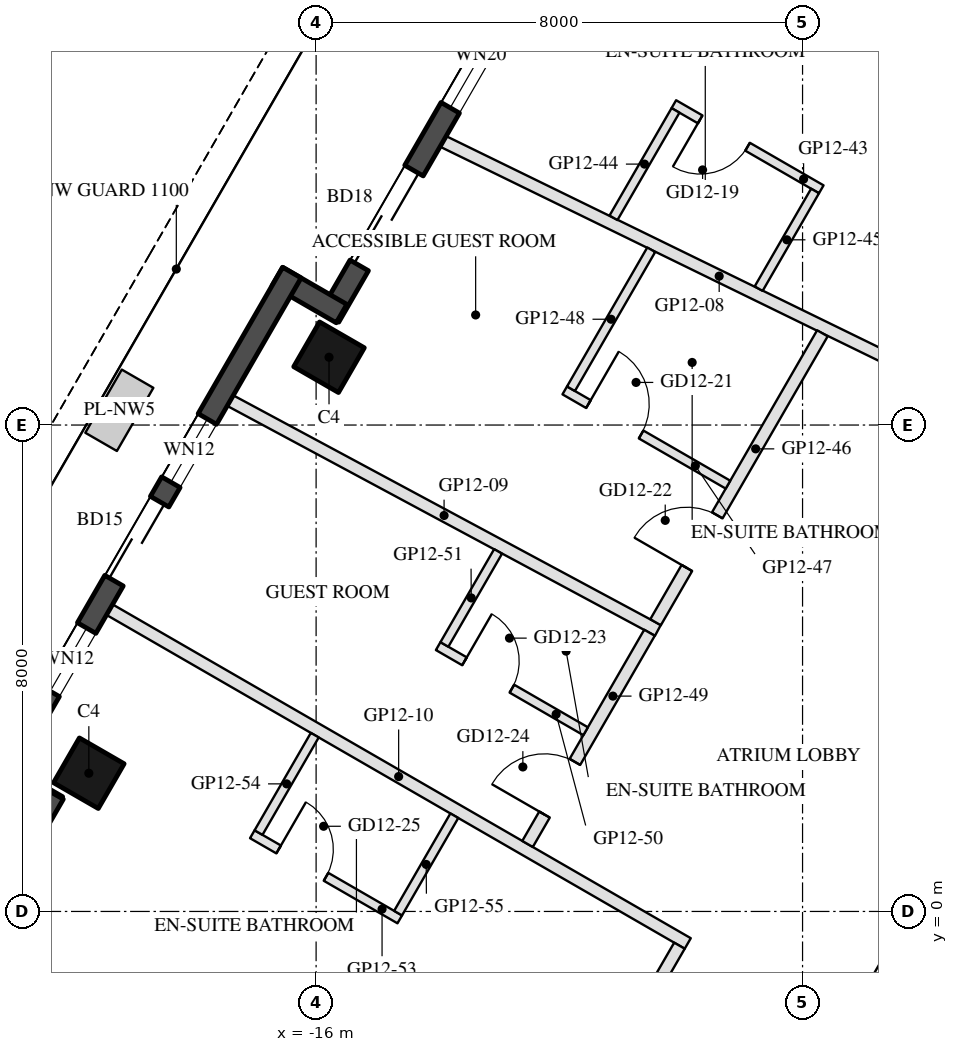
"""IFC4 building model, lengths in metres.
Left out: names, types, materials, properties, quantities, classifications, styles, units other than length and angle.
Written with IfcOpenShell. Run it as: python <this file> out.ifc"""

import sys

from ifc_helpers import new_model, si_unit, direction, frame, frame_2d, origin, origin_2d, place, context, subcontext, project, spatial, rectangle, hollow_rectangle, extrude, element, fill, save


model = new_model("IFC4")
c1 = context("Model", 3, precision=1e-05, world=origin(), true_north=direction((0.0, 1.0)))
c2 = subcontext(c1, "Body", "Model", "MODEL_VIEW")
j1 = project(units=[si_unit("LENGTHUNIT", "METRE"), si_unit("PLANEANGLEUNIT", "RADIAN")], contexts=[c1])
p1 = place(None, origin())
s1 = spatial("IfcSite", under=j1, at=p1, CompositionType="ELEMENT")
p2 = place(p1, origin())
s2 = spatial("IfcBuilding", under=s1, at=p2, CompositionType="ELEMENT")
p3 = place(p2, frame((0.0, 0.0, 150.3)))
s3 = spatial("IfcBuildingStorey", under=s2, at=p3, CompositionType="ELEMENT", Elevation=150.3)
for number, where, z_axis, x_axis in (
    (1, (-15.788, 9.115, 0.0), (0.0, 0.0, 1.0), (0.5, 0.866, 0.0)),
    (2, (-19.738, 2.273, 0.0), (0.0, 0.0, 1.0), (0.5, 0.866, 0.0)),
):
    element("IfcColumn", number, at=place(p3, frame(where, z_axis=z_axis, x_axis=x_axis)), inside=s3, PredefinedType="COLUMN", context=c2, shape_type="SweptSolid", body=[
        extrude(hollow_rectangle(XDim=0.85, YDim=0.85, WallThickness=0.04, at=origin_2d()), origin(), (0.0, 0.0, 1.0), 3.7),
    ])
p4 = place(p3, frame((-12.409, 15.617, 0.0), z_axis=(0.0, 0.0, 1.0), x_axis=(-0.500003597184, -0.866023326939, 0.0)))
e3 = element("IfcWall", 3, at=p4, inside=s3, PredefinedType="SOLIDWALL", context=c2, shape_type="SweptSolid", body=[
    extrude(rectangle(XDim=6.74, YDim=0.35, at=frame_2d((3.37, 0.0))), origin(), (0.0, 0.0, 1.0), 3.55),
])
p5 = place(p4, frame((0.77, 0.0, 0.3)))
e4 = element("IfcOpeningElement", 4, at=p5, cuts=e3, PredefinedType="OPENING", context=c2, shape_type="SweptSolid", body=[
    extrude(rectangle(XDim=2.0, YDim=2.65, at=frame_2d((1.0, 1.325))), frame((0.0, 0.185, 0.0), z_axis=(0.0, -1.0, 0.0), x_axis=(1.0, 0.0, 0.0)), (0.0, 0.0, 1.0), 0.37),
])
p6 = place(p4, frame((3.964, 0.0, 0.0)))
e5 = element("IfcOpeningElement", 5, at=p6, cuts=e3, PredefinedType="OPENING", context=c2, shape_type="SweptSolid", body=[
    extrude(rectangle(XDim=1.8, YDim=2.4, at=frame_2d((0.9, 1.2))), frame((0.0, 0.185, 0.0), z_axis=(0.0, -1.0, 0.0), x_axis=(1.0, 0.0, 0.0)), (0.0, 0.0, 1.0), 0.37),
])
p7 = place(p3, frame((-15.581, 9.833, 0.0), z_axis=(0.0, 0.0, 1.0), x_axis=(-0.866055662726, 0.499947586314, 0.0)))
e6 = element("IfcWall", 6, at=p7, inside=s3, PredefinedType="SOLIDWALL", context=c2, shape_type="SweptSolid", body=[
    extrude(rectangle(XDim=1.22, YDim=0.35, at=frame_2d((0.61, 0.0))), origin(), (0.0, 0.0, 1.0), 3.55),
])
p8 = place(p3, frame((-16.398, 10.507, 0.0), z_axis=(0.0, 0.0, 1.0), x_axis=(-0.499999142773, -0.866025898704, 0.0)))
e7 = element("IfcWall", 7, at=p8, inside=s3, PredefinedType="SOLIDWALL", context=c2, shape_type="SweptSolid", body=[
    extrude(rectangle(XDim=9.7, YDim=0.35, at=frame_2d((4.85, 0.0))), origin(), (0.0, 0.0, 1.0), 3.55),
])
p9 = place(p8, frame((4.35, 0.0, 0.0)))
e8 = element("IfcOpeningElement", 8, at=p9, cuts=e7, PredefinedType="OPENING", context=c2, shape_type="SweptSolid", body=[
    extrude(rectangle(XDim=1.5, YDim=2.4, at=frame_2d((0.75, 1.2))), frame((0.0, 0.185, 0.0), z_axis=(0.0, -1.0, 0.0), x_axis=(1.0, 0.0, 0.0)), (0.0, 0.0, 1.0), 0.37),
])
p10 = place(p8, frame((2.78, 0.0, 0.3)))
e9 = element("IfcOpeningElement", 9, at=p10, cuts=e7, PredefinedType="OPENING", context=c2, shape_type="SweptSolid", body=[
    extrude(rectangle(XDim=1.2, YDim=2.65, at=frame_2d((0.6, 1.325))), frame((0.0, 0.185, 0.0), z_axis=(0.0, -1.0, 0.0), x_axis=(1.0, 0.0, 0.0)), (0.0, 0.0, 1.0), 0.37),
])
p11 = place(p8, frame((6.75, 0.0, 0.3)))
e10 = element("IfcOpeningElement", 10, at=p11, cuts=e7, PredefinedType="OPENING", context=c2, shape_type="SweptSolid", body=[
    extrude(rectangle(XDim=1.2, YDim=2.65, at=frame_2d((0.6, 1.325))), frame((0.0, 0.185, 0.0), z_axis=(0.0, -1.0, 0.0), x_axis=(1.0, 0.0, 0.0)), (0.0, 0.0, 1.0), 0.37),
])
p12 = place(p3, frame((-21.312, 2.346, 0.0), z_axis=(0.0, 0.0, 1.0), x_axis=(0.866005645448, -0.500034220881, 0.0)))
e11 = element("IfcWall", 11, at=p12, inside=s3, PredefinedType="SOLIDWALL", context=c2, shape_type="SweptSolid", body=[
    extrude(rectangle(XDim=1.22, YDim=0.35, at=frame_2d((0.61, 0.0))), origin(), (0.0, 0.0, 1.0), 3.55),
])
p13 = place(p3, frame((-20.309, 1.934, 0.0), z_axis=(0.0, 0.0, 1.0), x_axis=(-0.499992114976, -0.866029956157, 0.0)))
e12 = element("IfcWall", 12, at=p13, inside=s3, PredefinedType="SOLIDWALL", context=c2, shape_type="SweptSolid", body=[
    extrude(rectangle(XDim=6.74, YDim=0.35, at=frame_2d((3.37, 0.0))), origin(), (0.0, 0.0, 1.0), 3.55),
])
p14 = place(p13, frame((0.77, 0.0, 0.0)))
e13 = element("IfcOpeningElement", 13, at=p14, cuts=e12, PredefinedType="OPENING", context=c2, shape_type="SweptSolid", body=[
    extrude(rectangle(XDim=2.4, YDim=2.4, at=frame_2d((1.2, 1.2))), frame((0.0, 0.185, 0.0), z_axis=(0.0, -1.0, 0.0), x_axis=(1.0, 0.0, 0.0)), (0.0, 0.0, 1.0), 0.37),
])
p15 = place(p13, frame((3.47, 0.0, 0.3)))
e14 = element("IfcOpeningElement", 14, at=p15, cuts=e12, PredefinedType="OPENING", context=c2, shape_type="SweptSolid", body=[
    extrude(rectangle(XDim=2.9, YDim=2.65, at=frame_2d((1.45, 1.325))), frame((0.0, 0.185, 0.0), z_axis=(0.0, -1.0, 0.0), x_axis=(1.0, 0.0, 0.0)), (0.0, 0.0, 1.0), 0.37),
])
p16 = place(p3, frame((-13.911, 12.665, 0.0), z_axis=(0.0, 0.0, 1.0), x_axis=(0.898639294085, -0.438688293811, 0.0)))
e15 = element("IfcWall", 15, at=p16, inside=s3, PredefinedType="PARTITIONING", context=c2, shape_type="SweptSolid", body=[
    extrude(rectangle(XDim=10.104, YDim=0.2, at=frame_2d((5.052, 0.0))), origin(), (0.0, 0.0, 1.0), 2.95),
])
p17 = place(p3, frame((-17.412, 8.402, 0.0), z_axis=(0.0, 0.0, 1.0), x_axis=(0.880917469793, -0.473269913912, 0.0)))
e16 = element("IfcWall", 16, at=p17, inside=s3, PredefinedType="PARTITIONING", context=c2, shape_type="SweptSolid", body=[
    extrude(rectangle(XDim=7.984, YDim=0.2, at=frame_2d((3.992, 0.0))), origin(), (0.0, 0.0, 1.0), 3.06),
])
p18 = place(p3, frame((-19.397, 4.963, 0.0), z_axis=(0.0, 0.0, 1.0), x_axis=(0.866027479907, -0.499996404033, 0.0)))
e17 = element("IfcWall", 17, at=p18, inside=s3, PredefinedType="PARTITIONING", context=c2, shape_type="SweptSolid", body=[
    extrude(rectangle(XDim=10.98, YDim=0.2, at=frame_2d((5.49, 0.0))), origin(), (0.0, 0.0, 1.0), 3.06),
])
p19 = place(p3, frame((-7.692, 11.877, 0.0), z_axis=(0.0, 0.0, 1.0), x_axis=(-0.866034573852, 0.49998411664, 0.0)))
e18 = element("IfcWall", 18, at=p19, inside=s3, PredefinedType="PARTITIONING", context=c2, shape_type="SweptSolid", body=[
    extrude(rectangle(XDim=2.8, YDim=0.15, at=frame_2d((1.4, 0.0))), origin(), (0.0, 0.0, 1.0), 3.55),
])
p20 = place(p19, frame((1.4, 0.0, 0.0)))
e19 = element("IfcOpeningElement", 19, at=p20, cuts=e18, PredefinedType="OPENING", context=c2, shape_type="SweptSolid", body=[
    extrude(rectangle(XDim=0.9, YDim=2.1, at=frame_2d((0.45, 1.05))), frame((0.0, 0.085, 0.0), z_axis=(0.0, -1.0, 0.0), x_axis=(1.0, 0.0, 0.0)), (0.0, 0.0, 1.0), 0.17),
])
p21 = place(p3, frame((-10.089, 13.175, 0.0), z_axis=(0.0, 0.0, 1.0), x_axis=(-0.499988401207, -0.866032100247, 0.0)))
e20 = element("IfcWall", 20, at=p21, inside=s3, PredefinedType="PARTITIONING", context=c2, shape_type="SweptSolid", body=[
    extrude(rectangle(XDim=2.04, YDim=0.15, at=frame_2d((1.02, 0.0))), origin(), (0.0, 0.0, 1.0), 3.55),
])
p22 = place(p3, frame((-7.794, 11.85, 0.0), z_axis=(0.0, 0.0, 1.0), x_axis=(-0.500003477455, -0.866023396066, 0.0)))
e21 = element("IfcWall", 21, at=p22, inside=s3, PredefinedType="PARTITIONING", context=c2, shape_type="SweptSolid", body=[
    extrude(rectangle(XDim=1.855, YDim=0.15, at=frame_2d((0.927, 0.0))), origin(), (0.0, 0.0, 1.0), 3.55),
])
p23 = place(p3, frame((-10.417, 4.757, 0.0), z_axis=(0.0, 0.0, 1.0), x_axis=(0.50000105825, 0.866024792803, 0.0)))
e22 = element("IfcWall", 22, at=p23, inside=s3, PredefinedType="PARTITIONING", context=c2, shape_type="SweptSolid", body=[
    extrude(rectangle(XDim=5.487, YDim=0.2, at=frame_2d((2.743, 0.0))), origin(), (0.0, 0.0, 1.0), 2.95),
])
p24 = place(p23, frame((1.03, 0.0, 0.0)))
e23 = element("IfcOpeningElement", 23, at=p24, cuts=e22, PredefinedType="OPENING", context=c2, shape_type="SweptSolid", body=[
    extrude(rectangle(XDim=1.0, YDim=2.1, at=frame_2d((0.5, 1.05))), frame((0.0, 0.11, 0.0), z_axis=(0.0, -1.0, 0.0), x_axis=(1.0, 0.0, 0.0)), (0.0, 0.0, 1.0), 0.22),
])
p25 = place(p3, frame((-11.911, 8.57, 0.0), z_axis=(0.0, 0.0, 1.0), x_axis=(0.86600983753, -0.500026960575, 0.0)))
e24 = element("IfcWall", 24, at=p25, inside=s3, PredefinedType="PARTITIONING", context=c2, shape_type="SweptSolid", body=[
    extrude(rectangle(XDim=3.1, YDim=0.15, at=frame_2d((1.55, 0.0))), origin(), (0.0, 0.0, 1.0), 3.55),
])
p26 = place(p25, frame((0.45, 0.0, 0.0)))
e25 = element("IfcOpeningElement", 25, at=p26, cuts=e24, PredefinedType="OPENING", context=c2, shape_type="SweptSolid", body=[
    extrude(rectangle(XDim=1.0, YDim=2.1, at=frame_2d((0.5, 1.05))), frame((0.0, 0.085, 0.0), z_axis=(0.0, -1.0, 0.0), x_axis=(1.0, 0.0, 0.0)), (0.0, 0.0, 1.0), 0.17),
])
p27 = place(p3, frame((-10.489, 10.883, 0.0), z_axis=(0.0, 0.0, 1.0), x_axis=(-0.500018690203, -0.866014612722, 0.0)))
e26 = element("IfcWall", 26, at=p27, inside=s3, PredefinedType="PARTITIONING", context=c2, shape_type="SweptSolid", body=[
    extrude(rectangle(XDim=2.64, YDim=0.15, at=frame_2d((1.32, 0.0))), origin(), (0.0, 0.0, 1.0), 2.95),
])
p28 = place(p3, frame((-12.523, 1.11, 0.0), z_axis=(0.0, 0.0, 1.0), x_axis=(0.500021015799, 0.866013269967, 0.0)))
e27 = element("IfcWall", 27, at=p28, inside=s3, PredefinedType="PARTITIONING", context=c2, shape_type="SweptSolid", body=[
    extrude(rectangle(XDim=4.011, YDim=0.2, at=frame_2d((2.005, 0.0))), origin(), (0.0, 0.0, 1.0), 2.95),
])
p29 = place(p28, frame((0.558, 0.0, 0.0)))
e28 = element("IfcOpeningElement", 28, at=p29, cuts=e27, PredefinedType="OPENING", context=c2, shape_type="SweptSolid", body=[
    extrude(rectangle(XDim=1.0, YDim=2.1, at=frame_2d((0.5, 1.05))), frame((0.0, 0.11, 0.0), z_axis=(0.0, -1.0, 0.0), x_axis=(1.0, 0.0, 0.0)), (0.0, 0.0, 1.0), 0.22),
])
p30 = place(p3, frame((-13.993, 4.364, 0.0), z_axis=(0.0, 0.0, 1.0), x_axis=(0.866056369097, -0.49994636267, 0.0)))
e29 = element("IfcWall", 29, at=p30, inside=s3, PredefinedType="PARTITIONING", context=c2, shape_type="SweptSolid", body=[
    extrude(rectangle(XDim=2.8, YDim=0.15, at=frame_2d((1.4, 0.0))), origin(), (0.0, 0.0, 1.0), 3.55),
])
p31 = place(p30, frame((0.5, 0.0, 0.0)))
e30 = element("IfcOpeningElement", 30, at=p31, cuts=e29, PredefinedType="OPENING", context=c2, shape_type="SweptSolid", body=[
    extrude(rectangle(XDim=0.9, YDim=2.1, at=frame_2d((0.45, 1.05))), frame((0.0, 0.085, 0.0), z_axis=(0.0, -1.0, 0.0), x_axis=(1.0, 0.0, 0.0)), (0.0, 0.0, 1.0), 0.17),
])
p32 = place(p3, frame((-13.007, 5.921, 0.0), z_axis=(0.0, 0.0, 1.0), x_axis=(-0.500033502416, -0.866006060292, 0.0)))
e31 = element("IfcWall", 31, at=p32, inside=s3, PredefinedType="PARTITIONING", context=c2, shape_type="SweptSolid", body=[
    extrude(rectangle(XDim=1.767, YDim=0.15, at=frame_2d((0.883, 0.0))), origin(), (0.0, 0.0, 1.0), 3.55),
])
p33 = place(p3, frame((-12.269, -4.45, 0.0), z_axis=(0.0, 0.0, 1.0), x_axis=(0.500000259638, 0.866025253883, 0.0)))
e32 = element("IfcWall", 32, at=p33, inside=s3, PredefinedType="PARTITIONING", context=c2, shape_type="SweptSolid", body=[
    extrude(rectangle(XDim=4.488, YDim=0.2, at=frame_2d((2.244, 0.0))), origin(), (0.0, 0.0, 1.0), 2.95),
])
p34 = place(p33, frame((1.744, 0.0, 0.0)))
e33 = element("IfcOpeningElement", 33, at=p34, cuts=e32, PredefinedType="OPENING", context=c2, shape_type="SweptSolid", body=[
    extrude(rectangle(XDim=1.0, YDim=2.1, at=frame_2d((0.5, 1.05))), frame((0.0, 0.11, 0.0), z_axis=(0.0, -1.0, 0.0), x_axis=(1.0, 0.0, 0.0)), (0.0, 0.0, 1.0), 0.22),
])
p35 = place(p3, frame((-17.049, 1.27, 0.0), z_axis=(0.0, 0.0, 1.0), x_axis=(0.866034573852, -0.49998411664, 0.0)))
e34 = element("IfcWall", 34, at=p35, inside=s3, PredefinedType="PARTITIONING", context=c2, shape_type="SweptSolid", body=[
    extrude(rectangle(XDim=2.8, YDim=0.15, at=frame_2d((1.4, 0.0))), origin(), (0.0, 0.0, 1.0), 3.55),
])
p36 = place(p35, frame((0.5, 0.0, 0.0)))
e35 = element("IfcOpeningElement", 35, at=p36, cuts=e34, PredefinedType="OPENING", context=c2, shape_type="SweptSolid", body=[
    extrude(rectangle(XDim=0.9, YDim=2.1, at=frame_2d((0.45, 1.05))), frame((0.0, 0.085, 0.0), z_axis=(0.0, -1.0, 0.0), x_axis=(1.0, 0.0, 0.0)), (0.0, 0.0, 1.0), 0.17),
])
for number, where, z_axis, x_axis in (
    (36, (-16.022, 2.899, 0.0), (0.0, 0.0, 1.0), (-0.5, -0.866, 0.0)),
    (37, (-13.727, 1.574, 0.0), (0.0, 0.0, 1.0), (-0.5, -0.866, 0.0)),
):
    element("IfcWall", number, at=place(p3, frame(where, z_axis=z_axis, x_axis=x_axis)), inside=s3, PredefinedType="PARTITIONING", context=c2, shape_type="SweptSolid", body=[
        extrude(rectangle(XDim=1.85, YDim=0.15, at=frame_2d((0.925, 0.0))), origin(), (0.0, 0.0, 1.0), 3.55),
    ])
p37 = place(p5, origin())
e38 = element("IfcWindow", 38, at=p37, inside=s3, PartitioningType="SINGLE_PANEL", PredefinedType="WINDOW", context=c2, shape_type="SweptSolid", body=[
    extrude(rectangle(XDim=2.0, YDim=2.65, at=frame_2d((1.0, 1.325))), frame((0.0, 0.03, 0.0), z_axis=(0.0, -1.0, 0.0), x_axis=(1.0, 0.0, 0.0)), (0.0, 0.0, 1.0), 0.06),
])
fill(e4, e38)
p38 = place(p6, frame((1.8, 0.0, 0.0), z_axis=(0.0, 0.0, 1.0), x_axis=(-1.0, 0.0, 0.0)))
e39 = element("IfcDoor", 39, at=p38, inside=s3, OperationType="SLIDING_TO_LEFT", PredefinedType="DOOR", context=c2, shape_type="SweptSolid", body=[
    extrude(rectangle(XDim=1.8, YDim=2.4, at=frame_2d((0.9, 1.2))), frame((0.0, 0.025, 0.0), z_axis=(0.0, -1.0, 0.0), x_axis=(1.0, 0.0, 0.0)), (0.0, 0.0, 1.0), 0.05),
])
fill(e5, e39)
p39 = place(p9, frame((1.5, 0.0, 0.0), z_axis=(0.0, 0.0, 1.0), x_axis=(-1.0, 0.0, 0.0)))
e40 = element("IfcDoor", 40, at=p39, inside=s3, OperationType="SLIDING_TO_LEFT", PredefinedType="DOOR", context=c2, shape_type="SweptSolid", body=[
    extrude(rectangle(XDim=1.5, YDim=2.4, at=frame_2d((0.75, 1.2))), frame((0.0, 0.025, 0.0), z_axis=(0.0, -1.0, 0.0), x_axis=(1.0, 0.0, 0.0)), (0.0, 0.0, 1.0), 0.05),
])
fill(e8, e40)
p40 = place(p10, origin())
e41 = element("IfcWindow", 41, at=p40, inside=s3, PartitioningType="SINGLE_PANEL", PredefinedType="WINDOW", context=c2, shape_type="SweptSolid", body=[
    extrude(rectangle(XDim=1.2, YDim=2.65, at=frame_2d((0.6, 1.325))), frame((0.0, 0.03, 0.0), z_axis=(0.0, -1.0, 0.0), x_axis=(1.0, 0.0, 0.0)), (0.0, 0.0, 1.0), 0.06),
])
fill(e9, e41)
p41 = place(p11, origin())
e42 = element("IfcWindow", 42, at=p41, inside=s3, PartitioningType="SINGLE_PANEL", PredefinedType="WINDOW", context=c2, shape_type="SweptSolid", body=[
    extrude(rectangle(XDim=1.2, YDim=2.65, at=frame_2d((0.6, 1.325))), frame((0.0, 0.03, 0.0), z_axis=(0.0, -1.0, 0.0), x_axis=(1.0, 0.0, 0.0)), (0.0, 0.0, 1.0), 0.06),
])
fill(e10, e42)
p42 = place(p20, origin())
e43 = element("IfcDoor", 43, at=p42, inside=s3, OperationType="SINGLE_SWING_RIGHT", PredefinedType="DOOR", context=c2, shape_type="SweptSolid", body=[
    extrude(rectangle(XDim=0.9, YDim=2.1, at=frame_2d((0.45, 1.05))), frame((0.0, 0.025, 0.0), z_axis=(0.0, -1.0, 0.0), x_axis=(1.0, 0.0, 0.0)), (0.0, 0.0, 1.0), 0.05),
])
fill(e19, e43)
p43 = place(p26, origin())
e44 = element("IfcDoor", 44, at=p43, inside=s3, OperationType="SINGLE_SWING_LEFT", PredefinedType="DOOR", context=c2, shape_type="SweptSolid", body=[
    extrude(rectangle(XDim=1.0, YDim=2.1, at=frame_2d((0.5, 1.05))), frame((0.0, 0.025, 0.0), z_axis=(0.0, -1.0, 0.0), x_axis=(1.0, 0.0, 0.0)), (0.0, 0.0, 1.0), 0.05),
])
fill(e25, e44)
p44 = place(p24, origin())
e45 = element("IfcDoor", 45, at=p44, inside=s3, OperationType="SINGLE_SWING_LEFT", PredefinedType="DOOR", context=c2, shape_type="SweptSolid", body=[
    extrude(rectangle(XDim=1.0, YDim=2.1, at=frame_2d((0.5, 1.05))), frame((0.0, 0.025, 0.0), z_axis=(0.0, -1.0, 0.0), x_axis=(1.0, 0.0, 0.0)), (0.0, 0.0, 1.0), 0.05),
])
fill(e23, e45)
p45 = place(p31, origin())
e46 = element("IfcDoor", 46, at=p45, inside=s3, OperationType="SINGLE_SWING_LEFT", PredefinedType="DOOR", context=c2, shape_type="SweptSolid", body=[
    extrude(rectangle(XDim=0.9, YDim=2.1, at=frame_2d((0.45, 1.05))), frame((0.0, 0.025, 0.0), z_axis=(0.0, -1.0, 0.0), x_axis=(1.0, 0.0, 0.0)), (0.0, 0.0, 1.0), 0.05),
])
fill(e30, e46)
p46 = place(p29, origin())
e47 = element("IfcDoor", 47, at=p46, inside=s3, OperationType="SINGLE_SWING_LEFT", PredefinedType="DOOR", context=c2, shape_type="SweptSolid", body=[
    extrude(rectangle(XDim=1.0, YDim=2.1, at=frame_2d((0.5, 1.05))), frame((0.0, 0.025, 0.0), z_axis=(0.0, -1.0, 0.0), x_axis=(1.0, 0.0, 0.0)), (0.0, 0.0, 1.0), 0.05),
])
fill(e28, e47)
p47 = place(p36, origin())
e48 = element("IfcDoor", 48, at=p47, inside=s3, OperationType="SINGLE_SWING_LEFT", PredefinedType="DOOR", context=c2, shape_type="SweptSolid", body=[
    extrude(rectangle(XDim=0.9, YDim=2.1, at=frame_2d((0.45, 1.05))), frame((0.0, 0.025, 0.0), z_axis=(0.0, -1.0, 0.0), x_axis=(1.0, 0.0, 0.0)), (0.0, 0.0, 1.0), 0.05),
])
fill(e35, e48)
save(model, sys.argv[1])
